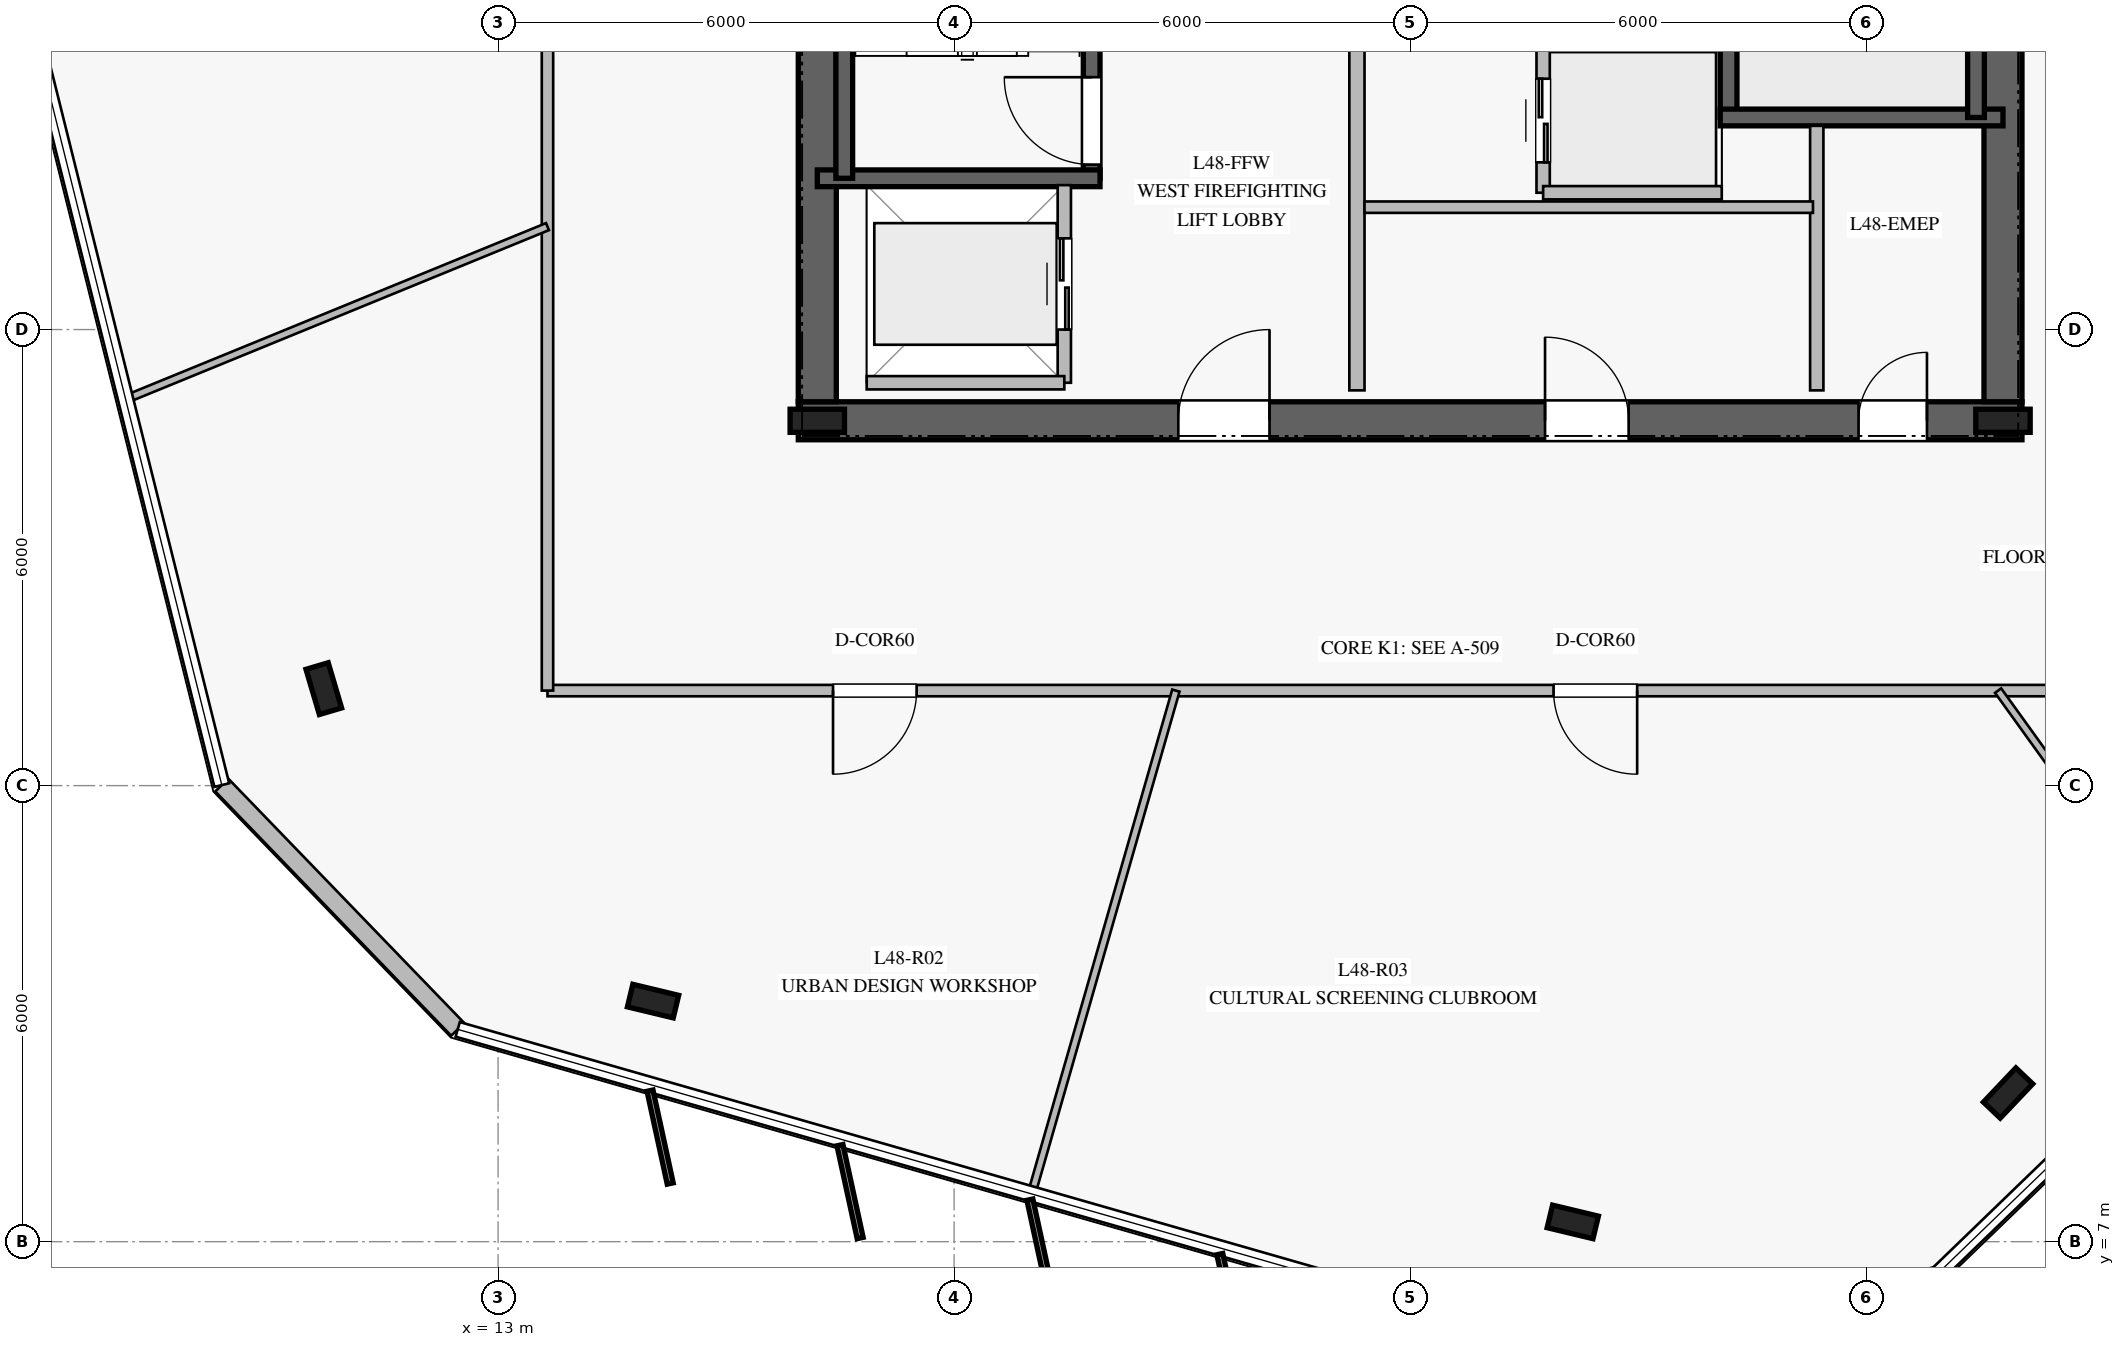
"""IFC4 building model, lengths in metres.
Left out: names, types, materials, properties, quantities, classifications, styles, units other than length and angle.
Written with IfcOpenShell. Run it as: python <this file> out.ifc"""

import sys

from ifc_helpers import new_model, si_unit, direction, frame, frame_2d, origin, origin_2d, place, context, subcontext, project, spatial, rectangle, i_section, extrude, element, fill, save


model = new_model("IFC4")
c1 = context("Model", 3, precision=1e-05, world=origin(), true_north=direction((0.0, 1.0)))
c2 = subcontext(c1, "Body", "Model", "MODEL_VIEW")
j1 = project(units=[si_unit("LENGTHUNIT", "METRE"), si_unit("PLANEANGLEUNIT", "RADIAN")], contexts=[c1])
p1 = place(None, origin())
s1 = spatial("IfcSite", under=j1, at=p1, CompositionType="ELEMENT")
p2 = place(p1, origin())
s2 = spatial("IfcBuilding", under=s1, at=p2, CompositionType="ELEMENT")
p3 = place(p2, frame((0.0, 0.0, 200.8)))
s3 = spatial("IfcBuildingStorey", under=s2, at=p3, CompositionType="ELEMENT", Elevation=200.8)
p4 = place(p3, frame((16.95, 17.8, 0.0), z_axis=(0.0, 0.0, 1.0), x_axis=(1.0, 0.0, 0.0)))
e1 = element("IfcWall", 1, at=p4, inside=s3, PredefinedType="SHEAR", context=c2, shape_type="SweptSolid", body=[
    extrude(rectangle(XDim=16.1, YDim=0.5, at=frame_2d((8.05, 0.0))), origin(), (0.0, 0.0, 1.0), 3.78),
])
p5 = place(p4, frame((5.0, 0.0, 0.0)))
e2 = element("IfcOpeningElement", 2, at=p5, cuts=e1, PredefinedType="OPENING", context=c2, shape_type="SweptSolid", body=[
    extrude(rectangle(XDim=1.2, YDim=2.25, at=frame_2d((0.6, 1.125))), frame((0.0, 0.26, 0.0), z_axis=(0.0, -1.0, 0.0), x_axis=(1.0, 0.0, 0.0)), (0.0, 0.0, 1.0), 0.52),
])
p6 = place(p4, frame((13.95, 0.0, 0.0)))
e3 = element("IfcOpeningElement", 3, at=p6, cuts=e1, PredefinedType="OPENING", context=c2, shape_type="SweptSolid", body=[
    extrude(rectangle(XDim=0.9, YDim=2.1, at=frame_2d((0.45, 1.05))), frame((0.0, 0.26, 0.0), z_axis=(0.0, -1.0, 0.0), x_axis=(1.0, 0.0, 0.0)), (0.0, 0.0, 1.0), 0.52),
])
p7 = place(p4, frame((9.825, 0.0, 0.0)))
e4 = element("IfcOpeningElement", 4, at=p7, cuts=e1, PredefinedType="OPENING", context=c2, shape_type="SweptSolid", body=[
    extrude(rectangle(XDim=1.1, YDim=2.2, at=frame_2d((0.55, 1.1))), frame((0.0, 0.26, 0.0), z_axis=(0.0, -1.0, 0.0), x_axis=(1.0, 0.0, 0.0)), (0.0, 0.0, 1.0), 0.52),
])
p8 = place(p3, frame((17.2, 31.95, 0.0), z_axis=(0.0, 0.0, 1.0), x_axis=(0.0, -1.0, 0.0)))
e5 = element("IfcWall", 5, at=p8, inside=s3, PredefinedType="SHEAR", context=c2, shape_type="SweptSolid", body=[
    extrude(rectangle(XDim=13.9, YDim=0.5, at=frame_2d((6.95, 0.0))), origin(), (0.0, 0.0, 1.0), 3.78),
])
p9 = place(p8, frame((2.1, 0.0, 0.0)))
e6 = element("IfcOpeningElement", 6, at=p9, cuts=e5, PredefinedType="OPENING", context=c2, shape_type="SweptSolid", body=[
    extrude(rectangle(XDim=1.5, YDim=2.2, at=frame_2d((0.75, 1.1))), frame((0.0, 0.26, 0.0), z_axis=(0.0, -1.0, 0.0), x_axis=(1.0, 0.0, 0.0)), (0.0, 0.0, 1.0), 0.52),
])
p10 = place(p3, frame((32.8, 18.05, 0.0), z_axis=(0.0, 0.0, 1.0), x_axis=(0.0, 1.0, 0.0)))
e7 = element("IfcWall", 7, at=p10, inside=s3, PredefinedType="SHEAR", context=c2, shape_type="SweptSolid", body=[
    extrude(rectangle(XDim=13.9, YDim=0.5, at=frame_2d((6.95, 0.0))), origin(), (0.0, 0.0, 1.0), 3.78),
])
for number, where, z_axis, x_axis in (
    (8, (17.2, 17.8, 0.0), (0.0, 0.0, 1.0), (1.0, 0.0, 0.0)),
    (9, (32.8, 17.8, 0.0), (0.0, 0.0, 1.0), (1.0, 0.0, 0.0)),
):
    element("IfcColumn", number, at=place(p3, frame(where, z_axis=z_axis, x_axis=x_axis)), inside=s3, PredefinedType="COLUMN", context=c2, shape_type="SweptSolid", body=[
        extrude(i_section(OverallWidth=0.304, OverallDepth=0.716, WebThickness=0.021, FlangeThickness=0.04, at=origin_2d()), origin(), (0.0, 0.0, 1.0), 4.0),
    ])
p11 = place(p3, frame((20.81, 20.99, 0.0), z_axis=(0.0, 0.0, 1.0), x_axis=(0.0, 1.0, 0.0)))
e10 = element("IfcWall", 10, at=p11, inside=s3, PredefinedType="SOLIDWALL", context=c2, shape_type="SweptSolid", body=[
    extrude(rectangle(XDim=7.22, YDim=0.22, at=frame_2d((3.61, 0.0))), origin(), (0.0, 0.0, 1.0), 3.78),
])
p12 = place(p11, frame((0.18, 0.0, 0.0)))
e11 = element("IfcOpeningElement", 11, at=p12, cuts=e10, PredefinedType="OPENING", context=c2, shape_type="SweptSolid", body=[
    extrude(rectangle(XDim=1.15, YDim=2.2, at=frame_2d((0.575, 1.1))), frame((0.0, 0.12, 0.0), z_axis=(0.0, -1.0, 0.0), x_axis=(1.0, 0.0, 0.0)), (0.0, 0.0, 1.0), 0.24),
])
p13 = place(p3, frame((17.2, 20.99, 0.0), z_axis=(0.0, 0.0, 1.0), x_axis=(1.0, 0.0, 0.0)))
e12 = element("IfcWall", 12, at=p13, inside=s3, PredefinedType="SOLIDWALL", context=c2, shape_type="SweptSolid", body=[
    extrude(rectangle(XDim=3.72, YDim=0.22, at=frame_2d((1.86, 0.0))), origin(), (0.0, 0.0, 1.0), 3.78),
])
p14 = place(p3, frame((17.555, 28.21, 0.0), z_axis=(0.0, 0.0, 1.0), x_axis=(0.0, -1.0, 0.0)))
e13 = element("IfcWall", 13, at=p14, inside=s3, PredefinedType="SOLIDWALL", context=c2, shape_type="SweptSolid", body=[
    extrude(rectangle(XDim=7.22, YDim=0.22, at=frame_2d((3.61, 0.0))), origin(), (0.0, 0.0, 1.0), 3.78),
])
p15 = place(p3, frame((29.19, 21.79, 0.0), z_axis=(0.0, 0.0, 1.0), x_axis=(0.0, 1.0, 0.0)))
e14 = element("IfcWall", 14, at=p15, inside=s3, PredefinedType="SOLIDWALL", context=c2, shape_type="SweptSolid", body=[
    extrude(rectangle(XDim=7.22, YDim=0.22, at=frame_2d((3.61, 0.0))), origin(), (0.0, 0.0, 1.0), 3.78),
])
p16 = place(p15, frame((5.88, 0.0, 0.0)))
e15 = element("IfcOpeningElement", 15, at=p16, cuts=e14, PredefinedType="OPENING", context=c2, shape_type="SweptSolid", body=[
    extrude(rectangle(XDim=1.15, YDim=2.2, at=frame_2d((0.575, 1.1))), frame((0.0, 0.12, 0.0), z_axis=(0.0, -1.0, 0.0), x_axis=(1.0, 0.0, 0.0)), (0.0, 0.0, 1.0), 0.24),
])
p17 = place(p3, frame((29.08, 21.79, 0.0), z_axis=(0.0, 0.0, 1.0), x_axis=(1.0, 0.0, 0.0)))
e16 = element("IfcWall", 16, at=p17, inside=s3, PredefinedType="SOLIDWALL", context=c2, shape_type="SweptSolid", body=[
    extrude(rectangle(XDim=3.72, YDim=0.22, at=frame_2d((1.86, 0.0))), origin(), (0.0, 0.0, 1.0), 3.78),
])
p18 = place(p3, frame((32.445, 29.01, 0.0), z_axis=(0.0, 0.0, 1.0), x_axis=(0.0, -1.0, 0.0)))
e17 = element("IfcWall", 17, at=p18, inside=s3, PredefinedType="SOLIDWALL", context=c2, shape_type="SweptSolid", body=[
    extrude(rectangle(XDim=7.22, YDim=0.22, at=frame_2d((3.61, 0.0))), origin(), (0.0, 0.0, 1.0), 3.78),
])
for number, where, z_axis, x_axis in (
    (18, (10.707, 14.276, 0.0), (0.0, 0.0, 1.0), (-0.284, 0.959, 0.0)),
    (19, (15.039, 10.165, 0.0), (0.0, 0.0, 1.0), (-0.972, 0.233, 0.0)),
    (20, (27.14, 7.26, 0.0), (0.0, 0.0, 1.0), (-0.972, 0.233, 0.0)),
    (21, (32.867, 8.956, 0.0), (0.0, 0.0, 1.0), (0.688, 0.725, 0.0)),
):
    element("IfcColumn", number, at=place(p3, frame(where, z_axis=z_axis, x_axis=x_axis)), inside=s3, PredefinedType="COLUMN", context=c2, shape_type="SweptSolid", body=[
        extrude(i_section(OverallWidth=0.305, OverallDepth=0.62, WebThickness=0.021, FlangeThickness=0.04, at=origin_2d()), origin(), (0.0, 0.0, 1.0), 4.0),
    ])
p19 = place(p3, frame((9.365, 13.007, 0.0), z_axis=(0.0, 0.0, 1.0), x_axis=(0.69467836701, -0.719320489357, 0.0)))
e22 = element("IfcWall", 22, at=p19, inside=s3, PredefinedType="STANDARD", context=c2, shape_type="SweptSolid", body=[
    extrude(rectangle(XDim=4.468, YDim=0.24, at=frame_2d((2.234, 0.0))), origin(), (0.0, 0.0, 1.0), 3.78),
])
p20 = place(p3, frame((24.3, 18.2, 0.0), z_axis=(0.0, 0.0, 1.0), x_axis=(0.0, 1.0, 0.0)))
e23 = element("IfcWall", 23, at=p20, inside=s3, PredefinedType="PARTITIONING", context=c2, shape_type="SweptSolid", body=[
    extrude(rectangle(XDim=5.15, YDim=0.2, at=frame_2d((2.575, 0.0))), origin(), (0.0, 0.0, 1.0), 3.78),
])
p21 = place(p3, frame((30.35, 18.2, 0.0), z_axis=(0.0, 0.0, 1.0), x_axis=(0.0, 1.0, 0.0)))
e24 = element("IfcWall", 24, at=p21, inside=s3, PredefinedType="PARTITIONING", context=c2, shape_type="SweptSolid", body=[
    extrude(rectangle(XDim=3.48, YDim=0.175, at=frame_2d((1.74, 0.0))), origin(), (0.0, 0.0, 1.0), 3.78),
])
p22 = place(p3, frame((24.4, 20.61, 0.0), z_axis=(0.0, 0.0, 1.0), x_axis=(1.0, 0.0, 0.0)))
e25 = element("IfcWall", 25, at=p22, inside=s3, PredefinedType="PARTITIONING", context=c2, shape_type="SweptSolid", body=[
    extrude(rectangle(XDim=5.9, YDim=0.15, at=frame_2d((2.95, 0.0))), origin(), (0.0, 0.0, 1.0), 3.78),
])
p23 = place(p3, frame((26.75, 20.8, 0.0), z_axis=(0.0, 0.0, 1.0), x_axis=(0.0, 1.0, 0.0)))
e26 = element("IfcWall", 26, at=p23, inside=s3, PredefinedType="PARTITIONING", context=c2, shape_type="SweptSolid", body=[
    extrude(rectangle(XDim=1.9, YDim=0.175, at=frame_2d((0.95, 0.0))), origin(), (0.0, 0.0, 1.0), 3.78),
])
p24 = place(p23, frame((0.4, 0.0, 0.0)))
e27 = element("IfcOpeningElement", 27, at=p24, cuts=e26, PredefinedType="OPENING", context=c2, shape_type="SweptSolid", body=[
    extrude(rectangle(XDim=1.1, YDim=2.2, at=frame_2d((0.55, 1.1))), frame((0.0, 0.098, 0.0), z_axis=(0.0, -1.0, 0.0), x_axis=(1.0, 0.0, 0.0)), (0.0, 0.0, 1.0), 0.195),
])
p25 = place(p3, frame((26.75, 20.8, 0.0), z_axis=(0.0, 0.0, 1.0), x_axis=(1.0, 0.0, 0.0)))
e28 = element("IfcWall", 28, at=p25, inside=s3, PredefinedType="PARTITIONING", context=c2, shape_type="SweptSolid", body=[
    extrude(rectangle(XDim=2.35, YDim=0.175, at=frame_2d((1.175, 0.0))), origin(), (0.0, 0.0, 1.0), 3.78),
])
p26 = place(p3, frame((20.45, 18.3, 0.0), z_axis=(0.0, 0.0, 1.0), x_axis=(0.0, 1.0, 0.0)))
e29 = element("IfcWall", 29, at=p26, inside=s3, PredefinedType="PARTITIONING", context=c2, shape_type="SweptSolid", body=[
    extrude(rectangle(XDim=2.6, YDim=0.175, at=frame_2d((1.3, 0.0))), origin(), (0.0, 0.0, 1.0), 3.78),
])
p27 = place(p26, frame((0.7, 0.0, 0.0)))
e30 = element("IfcOpeningElement", 30, at=p27, cuts=e29, PredefinedType="OPENING", context=c2, shape_type="SweptSolid", body=[
    extrude(rectangle(XDim=1.2, YDim=2.2, at=frame_2d((0.6, 1.1))), frame((0.0, 0.098, 0.0), z_axis=(0.0, -1.0, 0.0), x_axis=(1.0, 0.0, 0.0)), (0.0, 0.0, 1.0), 0.195),
])
p28 = place(p3, frame((17.85, 18.3, 0.0), z_axis=(0.0, 0.0, 1.0), x_axis=(1.0, 0.0, 0.0)))
e31 = element("IfcWall", 31, at=p28, inside=s3, PredefinedType="PARTITIONING", context=c2, shape_type="SweptSolid", body=[
    extrude(rectangle(XDim=2.6, YDim=0.175, at=frame_2d((1.3, 0.0))), origin(), (0.0, 0.0, 1.0), 3.78),
])
p29 = place(p3, frame((36.35, 14.25, 0.0), z_axis=(0.0, 0.0, 1.0), x_axis=(-1.0, 0.0, 0.0)))
e32 = element("IfcWall", 32, at=p29, inside=s3, PredefinedType="PARTITIONING", context=c2, shape_type="SweptSolid", body=[
    extrude(rectangle(XDim=22.7, YDim=0.15, at=frame_2d((11.35, 0.0))), origin(), (0.0, 0.0, 1.0), 3.28),
])
p30 = place(p29, frame((17.843, 0.0, 0.0)))
e33 = element("IfcOpeningElement", 33, at=p30, cuts=e32, PredefinedType="OPENING", context=c2, shape_type="SweptSolid", body=[
    extrude(rectangle(XDim=1.1, YDim=2.2, at=frame_2d((0.55, 1.1))), frame((0.0, 0.085, 0.0), z_axis=(0.0, -1.0, 0.0), x_axis=(1.0, 0.0, 0.0)), (0.0, 0.0, 1.0), 0.17),
])
p31 = place(p29, frame((8.363, 0.0, 0.0)))
e34 = element("IfcOpeningElement", 34, at=p31, cuts=e32, PredefinedType="OPENING", context=c2, shape_type="SweptSolid", body=[
    extrude(rectangle(XDim=1.1, YDim=2.2, at=frame_2d((0.55, 1.1))), frame((0.0, 0.085, 0.0), z_axis=(0.0, -1.0, 0.0), x_axis=(1.0, 0.0, 0.0)), (0.0, 0.0, 1.0), 0.17),
])
p32 = place(p3, frame((13.65, 14.25, 0.0), z_axis=(0.0, 0.0, 1.0), x_axis=(0.0, 1.0, 0.0)))
e35 = element("IfcWall", 35, at=p32, inside=s3, PredefinedType="PARTITIONING", context=c2, shape_type="SweptSolid", body=[
    extrude(rectangle(XDim=21.5, YDim=0.15, at=frame_2d((10.75, 0.0))), origin(), (0.0, 0.0, 1.0), 3.05),
])
p33 = place(p32, frame((11.591, 0.0, 0.0)))
e36 = element("IfcOpeningElement", 36, at=p33, cuts=e35, PredefinedType="OPENING", context=c2, shape_type="SweptSolid", body=[
    extrude(rectangle(XDim=1.1, YDim=2.2, at=frame_2d((0.55, 1.1))), frame((0.0, 0.085, 0.0), z_axis=(0.0, -1.0, 0.0), x_axis=(1.0, 0.0, 0.0)), (0.0, 0.0, 1.0), 0.17),
])
p34 = place(p3, frame((13.65, 20.354, 0.0), z_axis=(0.0, 0.0, 1.0), x_axis=(-0.925511186293, -0.378720271503, 0.0)))
e37 = element("IfcWall", 37, at=p34, inside=s3, PredefinedType="MOVABLE", context=c2, shape_type="SweptSolid", body=[
    extrude(rectangle(XDim=5.98, YDim=0.1, at=frame_2d((2.99, 0.0))), origin(), (0.0, 0.0, 1.0), 3.05),
])
p35 = place(p3, frame((21.918, 14.25, 0.0), z_axis=(0.0, 0.0, 1.0), x_axis=(-0.27574381978, -0.961231161507, 0.0)))
e38 = element("IfcWall", 38, at=p35, inside=s3, PredefinedType="MOVABLE", context=c2, shape_type="SweptSolid", body=[
    extrude(rectangle(XDim=6.872, YDim=0.1, at=frame_2d((3.436, 0.0))), origin(), (0.0, 0.0, 1.0), 3.18),
])
p36 = place(p3, frame((32.736, 14.25, 0.0), z_axis=(0.0, 0.0, 1.0), x_axis=(0.584181233506, -0.81162324167, 0.0)))
e39 = element("IfcWall", 39, at=p36, inside=s3, PredefinedType="MOVABLE", context=c2, shape_type="SweptSolid", body=[
    extrude(rectangle(XDim=5.0, YDim=0.1, at=frame_2d((2.5, 0.0))), origin(), (0.0, 0.0, 1.0), 3.18),
])
p37 = place(p12, origin())
e40 = element("IfcDoor", 40, at=p37, inside=s3, OperationType="SINGLE_SWING_RIGHT", PredefinedType="DOOR", context=c2, shape_type="SweptSolid", body=[
    extrude(rectangle(XDim=1.15, YDim=2.2, at=frame_2d((0.575, 1.1))), frame((0.0, 0.025, 0.0), z_axis=(0.0, -1.0, 0.0), x_axis=(1.0, 0.0, 0.0)), (0.0, 0.0, 1.0), 0.05),
])
fill(e11, e40)
p38 = place(p5, origin())
e41 = element("IfcDoor", 41, at=p38, inside=s3, OperationType="SINGLE_SWING_RIGHT", PredefinedType="DOOR", context=c2, shape_type="SweptSolid", body=[
    extrude(rectangle(XDim=1.2, YDim=2.25, at=frame_2d((0.6, 1.125))), frame((0.0, 0.025, 0.0), z_axis=(0.0, -1.0, 0.0), x_axis=(1.0, 0.0, 0.0)), (0.0, 0.0, 1.0), 0.05),
])
fill(e2, e41)
p39 = place(p6, origin())
e42 = element("IfcDoor", 42, at=p39, inside=s3, OperationType="SINGLE_SWING_RIGHT", PredefinedType="DOOR", context=c2, shape_type="SweptSolid", body=[
    extrude(rectangle(XDim=0.9, YDim=2.1, at=frame_2d((0.45, 1.05))), frame((0.0, 0.025, 0.0), z_axis=(0.0, -1.0, 0.0), x_axis=(1.0, 0.0, 0.0)), (0.0, 0.0, 1.0), 0.05),
])
fill(e3, e42)
p40 = place(p7, origin())
e43 = element("IfcDoor", 43, at=p40, inside=s3, OperationType="SINGLE_SWING_LEFT", PredefinedType="DOOR", context=c2, shape_type="SweptSolid", body=[
    extrude(rectangle(XDim=1.1, YDim=2.2, at=frame_2d((0.55, 1.1))), frame((0.0, 0.025, 0.0), z_axis=(0.0, -1.0, 0.0), x_axis=(1.0, 0.0, 0.0)), (0.0, 0.0, 1.0), 0.05),
])
fill(e4, e43)
p41 = place(p24, origin())
e44 = element("IfcDoor", 44, at=p41, inside=s3, OperationType="DOUBLE_DOOR_SLIDING", PredefinedType="DOOR", context=c2, shape_type="SweptSolid", body=[
    extrude(rectangle(XDim=1.1, YDim=2.2, at=frame_2d((0.55, 1.1))), frame((0.0, 0.025, 0.0), z_axis=(0.0, -1.0, 0.0), x_axis=(1.0, 0.0, 0.0)), (0.0, 0.0, 1.0), 0.05),
])
fill(e27, e44)
p42 = place(p27, origin())
e45 = element("IfcDoor", 45, at=p42, inside=s3, OperationType="DOUBLE_DOOR_SLIDING", PredefinedType="DOOR", context=c2, shape_type="SweptSolid", body=[
    extrude(rectangle(XDim=1.2, YDim=2.2, at=frame_2d((0.6, 1.1))), frame((0.0, 0.025, 0.0), z_axis=(0.0, -1.0, 0.0), x_axis=(1.0, 0.0, 0.0)), (0.0, 0.0, 1.0), 0.05),
])
fill(e30, e45)
p43 = place(p30, origin())
e46 = element("IfcDoor", 46, at=p43, inside=s3, OperationType="SINGLE_SWING_RIGHT", PredefinedType="DOOR", context=c2, shape_type="SweptSolid", body=[
    extrude(rectangle(XDim=1.1, YDim=2.2, at=frame_2d((0.55, 1.1))), frame((0.0, 0.025, 0.0), z_axis=(0.0, -1.0, 0.0), x_axis=(1.0, 0.0, 0.0)), (0.0, 0.0, 1.0), 0.05),
])
fill(e33, e46)
p44 = place(p31, origin())
e47 = element("IfcDoor", 47, at=p44, inside=s3, OperationType="SINGLE_SWING_LEFT", PredefinedType="DOOR", context=c2, shape_type="SweptSolid", body=[
    extrude(rectangle(XDim=1.1, YDim=2.2, at=frame_2d((0.55, 1.1))), frame((0.0, 0.025, 0.0), z_axis=(0.0, -1.0, 0.0), x_axis=(1.0, 0.0, 0.0)), (0.0, 0.0, 1.0), 0.05),
])
fill(e34, e47)
save(model, sys.argv[1])
